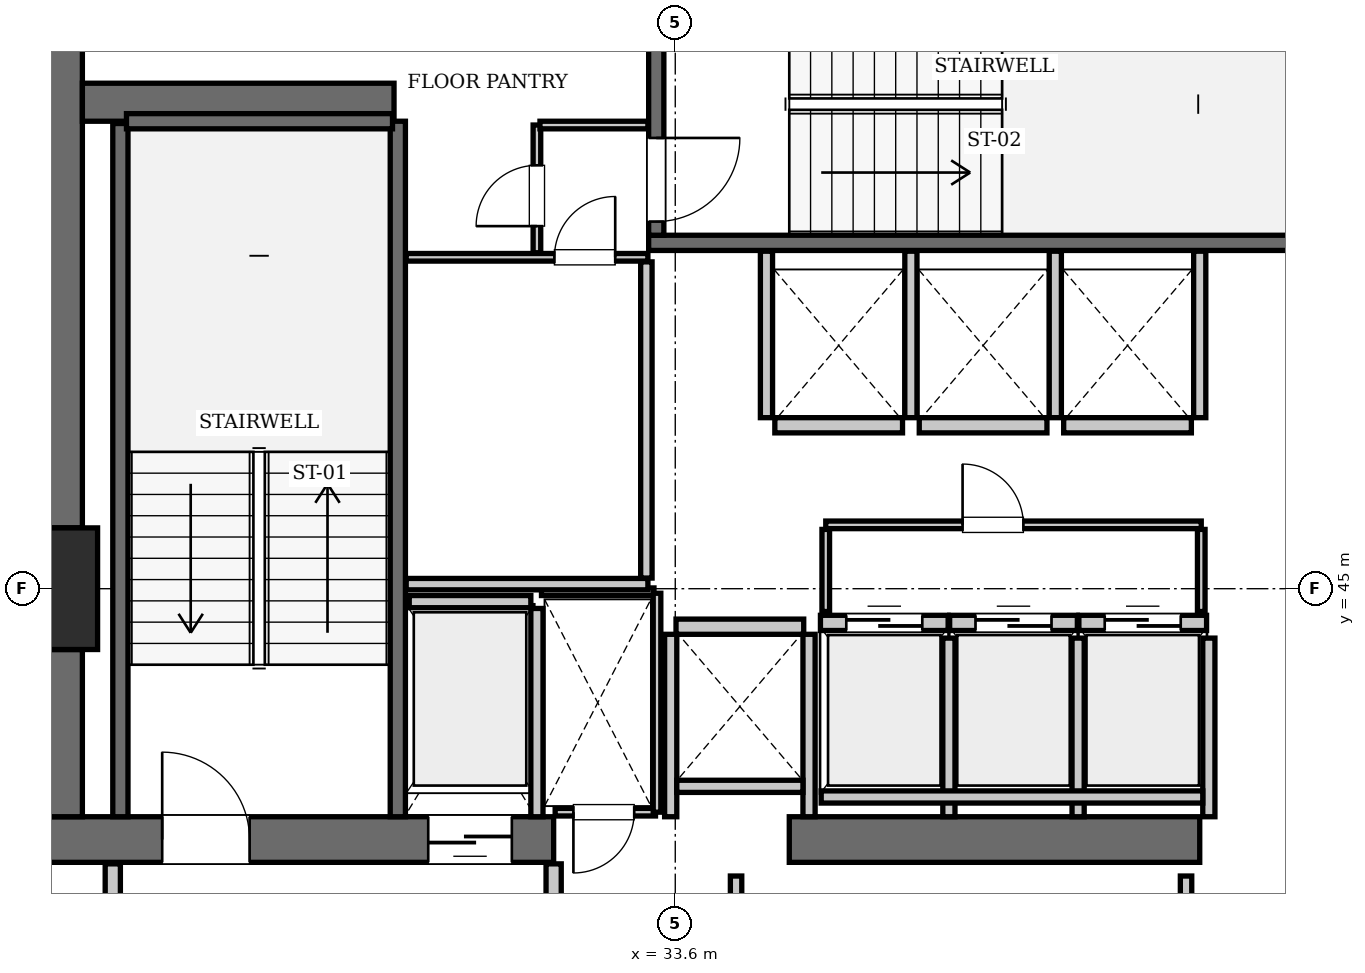
"""IFC4 building model, lengths in metres.
Left out: names, types, materials, properties, quantities, classifications, styles, units other than length and angle.
Written with IfcOpenShell. Run it as: python <this file> out.ifc"""

import sys

from ifc_helpers import new_model, si_unit, direction, frame, frame_2d, origin, origin_2d, place, context, subcontext, project, spatial, rectangle, extrude, element, fill, save


model = new_model("IFC4")
c1 = context("Model", 3, precision=1e-05, world=origin(), true_north=direction((0.0, 1.0)))
c2 = subcontext(c1, "Body", "Model", "MODEL_VIEW")
j1 = project(units=[si_unit("LENGTHUNIT", "METRE"), si_unit("PLANEANGLEUNIT", "RADIAN")], contexts=[c1])
p1 = place(None, origin())
s1 = spatial("IfcSite", under=j1, at=p1, CompositionType="ELEMENT")
p2 = place(p1, origin())
s2 = spatial("IfcBuilding", under=s1, at=p2, CompositionType="ELEMENT")
p3 = place(p2, frame((0.0, 0.0, 293.3)))
s3 = spatial("IfcBuildingStorey", under=s2, at=p3, CompositionType="ELEMENT", Elevation=293.3)
p4 = place(p3, frame((25.2, 45.0, 0.0), z_axis=(0.0, 0.0, 1.0), x_axis=(1.0, 0.0, 0.0)))
e1 = element("IfcColumn", 1, at=p4, inside=s3, PredefinedType="COLUMN", context=c2, shape_type="SweptSolid", body=[
    extrude(rectangle(XDim=1.6, YDim=1.6, at=origin_2d()), origin(), (0.0, 0.0, 1.0), 3.85),
])
p5 = place(p3, frame((25.2, 41.7, 0.0), z_axis=(0.0, 0.0, 1.0), x_axis=(1.0, 0.0, 0.0)))
e2 = element("IfcWall", 2, at=p5, inside=s3, PredefinedType="SHEAR", context=c2, shape_type="SweptSolid", body=[
    extrude(rectangle(XDim=6.8, YDim=0.6, at=frame_2d((3.4, 0.0))), origin(), (0.0, 0.0, 1.0), 3.85),
])
p6 = place(p5, frame((1.65, 0.0, 0.0)))
e3 = element("IfcOpeningElement", 3, at=p6, cuts=e2, PredefinedType="OPENING", context=c2, shape_type="SweptSolid", body=[
    extrude(rectangle(XDim=1.15, YDim=2.15, at=frame_2d((0.575, 1.075))), frame((0.0, 0.31, 0.0), z_axis=(0.0, -1.0, 0.0), x_axis=(1.0, 0.0, 0.0)), (0.0, 0.0, 1.0), 0.62),
])
p7 = place(p5, frame((5.15, 0.0, 0.0)))
e4 = element("IfcOpeningElement", 4, at=p7, cuts=e2, PredefinedType="OPENING", context=c2, shape_type="SweptSolid", body=[
    extrude(rectangle(XDim=1.1, YDim=2.2, at=frame_2d((0.55, 1.1))), frame((0.0, 0.31, 0.0), z_axis=(0.0, -1.0, 0.0), x_axis=(1.0, 0.0, 0.0)), (0.0, 0.0, 1.0), 0.62),
])
p8 = place(p3, frame((35.1, 41.7, 0.0), z_axis=(0.0, 0.0, 1.0), x_axis=(1.0, 0.0, 0.0)))
e5 = element("IfcWall", 5, at=p8, inside=s3, PredefinedType="SHEAR", context=c2, shape_type="SweptSolid", body=[
    extrude(rectangle(XDim=5.4, YDim=0.6, at=frame_2d((2.7, 0.0))), origin(), (0.0, 0.0, 1.0), 3.85),
])
p9 = place(p3, frame((25.5, 42.0, 0.0), z_axis=(0.0, 0.0, 1.0), x_axis=(0.0, 1.0, 0.0)))
e6 = element("IfcWall", 6, at=p9, inside=s3, PredefinedType="SHEAR", context=c2, shape_type="SweptSolid", body=[
    extrude(rectangle(XDim=2.2, YDim=0.6, at=frame_2d((1.1, 0.0))), origin(), (0.0, 0.0, 1.0), 3.85),
])
p10 = place(p3, frame((25.5, 45.8, 0.0), z_axis=(0.0, 0.0, 1.0), x_axis=(0.0, 1.0, 0.0)))
e7 = element("IfcWall", 7, at=p10, inside=s3, PredefinedType="SHEAR", context=c2, shape_type="SweptSolid", body=[
    extrude(rectangle(XDim=7.6, YDim=0.6, at=frame_2d((3.8, 0.0))), origin(), (0.0, 0.0, 1.0), 3.85),
])
p11 = place(p3, frame((25.8, 51.4, 0.0), z_axis=(0.0, 0.0, 1.0), x_axis=(1.0, 0.0, 0.0)))
e8 = element("IfcWall", 8, at=p11, inside=s3, PredefinedType="SHEAR", context=c2, shape_type="SweptSolid", body=[
    extrude(rectangle(XDim=4.1, YDim=0.5, at=frame_2d((2.05, 0.0))), origin(), (0.0, 0.0, 1.0), 3.85),
])
p12 = place(p3, frame((29.95, 42.0, 0.0), z_axis=(0.0, 0.0, 1.0), x_axis=(0.0, 1.0, 0.0)))
e9 = element("IfcWall", 9, at=p12, inside=s3, PredefinedType="SOLIDWALL", context=c2, shape_type="SweptSolid", body=[
    extrude(rectangle(XDim=9.15, YDim=0.2, at=frame_2d((4.575, 0.0))), origin(), (0.0, 0.0, 1.0), 3.61),
])
p13 = place(p3, frame((26.3, 42.0, 0.0), z_axis=(0.0, 0.0, 1.0), x_axis=(0.0, 1.0, 0.0)))
e10 = element("IfcWall", 10, at=p13, inside=s3, PredefinedType="SOLIDWALL", context=c2, shape_type="SweptSolid", body=[
    extrude(rectangle(XDim=9.12, YDim=0.2, at=frame_2d((4.56, 0.0))), origin(), (0.0, 0.0, 1.0), 3.61),
])
p14 = place(p3, frame((26.38, 51.15, 0.0), z_axis=(0.0, 0.0, 1.0), x_axis=(1.0, 0.0, 0.0)))
e11 = element("IfcWall", 11, at=p14, inside=s3, PredefinedType="SOLIDWALL", context=c2, shape_type="SweptSolid", body=[
    extrude(rectangle(XDim=3.5, YDim=0.2, at=frame_2d((1.75, 0.0))), origin(), (0.0, 0.0, 1.0), 3.61),
])
p15 = place(p3, frame((33.25, 49.55, 0.0), z_axis=(0.0, 0.0, 1.0), x_axis=(1.0, 0.0, 0.0)))
e12 = element("IfcWall", 12, at=p15, inside=s3, PredefinedType="SOLIDWALL", context=c2, shape_type="SweptSolid", body=[
    extrude(rectangle(XDim=9.1, YDim=0.2, at=frame_2d((4.55, 0.0))), origin(), (0.0, 0.0, 1.0), 3.61),
])
p16 = place(p3, frame((33.35, 49.65, 0.0), z_axis=(0.0, 0.0, 1.0), x_axis=(0.0, 1.0, 0.0)))
e13 = element("IfcWall", 13, at=p16, inside=s3, PredefinedType="SOLIDWALL", context=c2, shape_type="SweptSolid", body=[
    extrude(rectangle(XDim=3.75, YDim=0.2, at=frame_2d((1.875, 0.0))), origin(), (0.0, 0.0, 1.0), 3.61),
])
p17 = place(p16, frame((0.18, 0.0, 0.0)))
e14 = element("IfcOpeningElement", 14, at=p17, cuts=e13, PredefinedType="OPENING", context=c2, shape_type="SweptSolid", body=[
    extrude(rectangle(XDim=1.1, YDim=2.15, at=frame_2d((0.55, 1.075))), frame((0.0, 0.11, 0.0), z_axis=(0.0, -1.0, 0.0), x_axis=(1.0, 0.0, 0.0)), (0.0, 0.0, 1.0), 0.22),
])
p18 = place(p3, frame((35.51, 44.55, 0.0), z_axis=(0.0, 0.0, 1.0), x_axis=(1.0, 0.0, 0.0)))
e15 = element("IfcWall", 15, at=p18, inside=s3, PredefinedType="SOLIDWALL", context=c2, shape_type="SweptSolid", body=[
    extrude(rectangle(XDim=1.68, YDim=0.2, at=frame_2d((0.84, 0.0))), origin(), (0.0, 0.0, 1.0), 3.61),
])
p19 = place(p18, frame((0.34, 0.0, 0.0)))
e16 = element("IfcOpeningElement", 16, at=p19, cuts=e15, PredefinedType="OPENING", context=c2, shape_type="SweptSolid", body=[
    extrude(rectangle(XDim=1.0, YDim=2.15, at=frame_2d((0.5, 1.075))), frame((0.0, 0.11, 0.0), z_axis=(0.0, -1.0, 0.0), x_axis=(1.0, 0.0, 0.0)), (0.0, 0.0, 1.0), 0.22),
])
p20 = place(p3, frame((37.21, 44.55, 0.0), z_axis=(0.0, 0.0, 1.0), x_axis=(1.0, 0.0, 0.0)))
e17 = element("IfcWall", 17, at=p20, inside=s3, PredefinedType="SOLIDWALL", context=c2, shape_type="SweptSolid", body=[
    extrude(rectangle(XDim=1.68, YDim=0.2, at=frame_2d((0.84, 0.0))), origin(), (0.0, 0.0, 1.0), 3.61),
])
p21 = place(p20, frame((0.34, 0.0, 0.0)))
e18 = element("IfcOpeningElement", 18, at=p21, cuts=e17, PredefinedType="OPENING", context=c2, shape_type="SweptSolid", body=[
    extrude(rectangle(XDim=1.0, YDim=2.15, at=frame_2d((0.5, 1.075))), frame((0.0, 0.11, 0.0), z_axis=(0.0, -1.0, 0.0), x_axis=(1.0, 0.0, 0.0)), (0.0, 0.0, 1.0), 0.22),
])
p22 = place(p3, frame((38.91, 44.55, 0.0), z_axis=(0.0, 0.0, 1.0), x_axis=(1.0, 0.0, 0.0)))
e19 = element("IfcWall", 19, at=p22, inside=s3, PredefinedType="SOLIDWALL", context=c2, shape_type="SweptSolid", body=[
    extrude(rectangle(XDim=1.68, YDim=0.2, at=frame_2d((0.84, 0.0))), origin(), (0.0, 0.0, 1.0), 3.61),
])
p23 = place(p22, frame((0.34, 0.0, 0.0)))
e20 = element("IfcOpeningElement", 20, at=p23, cuts=e19, PredefinedType="OPENING", context=c2, shape_type="SweptSolid", body=[
    extrude(rectangle(XDim=1.0, YDim=2.15, at=frame_2d((0.5, 1.075))), frame((0.0, 0.11, 0.0), z_axis=(0.0, -1.0, 0.0), x_axis=(1.0, 0.0, 0.0)), (0.0, 0.0, 1.0), 0.22),
])
p24 = place(p3, frame((34.91, 47.15, 0.0), z_axis=(0.0, 0.0, 1.0), x_axis=(1.0, 0.0, 0.0)))
e21 = element("IfcWall", 21, at=p24, inside=s3, PredefinedType="SOLIDWALL", context=c2, shape_type="SweptSolid", body=[
    extrude(rectangle(XDim=1.68, YDim=0.2, at=frame_2d((0.84, 0.0))), origin(), (0.0, 0.0, 1.0), 3.61),
])
for number, where, z_axis, x_axis in (
    (22, (36.81, 47.15, 0.0), (0.0, 0.0, 1.0), (1.0, 0.0, 0.0)),
    (23, (38.71, 47.15, 0.0), (0.0, 0.0, 1.0), (1.0, 0.0, 0.0)),
    (24, (33.61, 44.5, 0.0), (0.0, 0.0, 1.0), (1.0, 0.0, 0.0)),
):
    element("IfcWall", number, at=place(p3, frame(where, z_axis=z_axis, x_axis=x_axis)), inside=s3, PredefinedType="SOLIDWALL", context=c2, shape_type="SweptSolid", body=[
        extrude(rectangle(XDim=1.68, YDim=0.2, at=frame_2d((0.84, 0.0))), origin(), (0.0, 0.0, 1.0), 3.61),
    ])
p25 = place(p3, frame((30.1, 44.83, 0.0), z_axis=(0.0, 0.0, 1.0), x_axis=(1.0, 0.0, 0.0)))
e25 = element("IfcWall", 25, at=p25, inside=s3, PredefinedType="SOLIDWALL", context=c2, shape_type="SweptSolid", body=[
    extrude(rectangle(XDim=1.6, YDim=0.16, at=frame_2d((0.8, 0.0))), origin(), (0.0, 0.0, 1.0), 3.61),
])
p26 = place(p3, frame((31.78, 42.0, 0.0), z_axis=(0.0, 0.0, 1.0), x_axis=(0.0, 1.0, 0.0)))
e26 = element("IfcWall", 26, at=p26, inside=s3, PredefinedType="SOLIDWALL", context=c2, shape_type="SweptSolid", body=[
    extrude(rectangle(XDim=2.74, YDim=0.16, at=frame_2d((1.37, 0.0))), origin(), (0.0, 0.0, 1.0), 3.61),
])
for number, where, z_axis, x_axis in (
    (27, (37.2, 42.0, 0.0), (0.0, 0.0, 1.0), (0.0, 1.0, 0.0)),
    (28, (38.9, 42.0, 0.0), (0.0, 0.0, 1.0), (0.0, 1.0, 0.0)),
    (29, (40.62, 42.0, 0.0), (0.0, 0.0, 1.0), (0.0, 1.0, 0.0)),
):
    element("IfcWall", number, at=place(p3, frame(where, z_axis=z_axis, x_axis=x_axis)), inside=s3, PredefinedType="SOLIDWALL", context=c2, shape_type="SweptSolid", body=[
        extrude(rectangle(XDim=2.35, YDim=0.16, at=frame_2d((1.175, 0.0))), origin(), (0.0, 0.0, 1.0), 3.61),
    ])
p27 = place(p3, frame((35.52, 42.26, 0.0), z_axis=(0.0, 0.0, 1.0), x_axis=(1.0, 0.0, 0.0)))
e30 = element("IfcWall", 30, at=p27, inside=s3, PredefinedType="SOLIDWALL", context=c2, shape_type="SweptSolid", body=[
    extrude(rectangle(XDim=5.02, YDim=0.16, at=frame_2d((2.51, 0.0))), origin(), (0.0, 0.0, 1.0), 3.61),
])
for number, where, z_axis, x_axis in (
    (31, (34.8, 47.25, 0.0), (0.0, 0.0, 1.0), (0.0, 1.0, 0.0)),
    (32, (36.7, 47.25, 0.0), (0.0, 0.0, 1.0), (0.0, 1.0, 0.0)),
    (33, (38.6, 47.25, 0.0), (0.0, 0.0, 1.0), (0.0, 1.0, 0.0)),
    (34, (40.5, 47.25, 0.0), (0.0, 0.0, 1.0), (0.0, 1.0, 0.0)),
):
    element("IfcWall", number, at=place(p3, frame(where, z_axis=z_axis, x_axis=x_axis)), inside=s3, PredefinedType="SOLIDWALL", context=c2, shape_type="SweptSolid", body=[
        extrude(rectangle(XDim=2.19, YDim=0.16, at=frame_2d((1.095, 0.0))), origin(), (0.0, 0.0, 1.0), 3.61),
    ])
for number, where, z_axis, x_axis in (
    (35, (33.54, 42.0, 0.0), (0.0, 0.0, 1.0), (0.0, 1.0, 0.0)),
    (36, (35.36, 42.0, 0.0), (0.0, 0.0, 1.0), (0.0, 1.0, 0.0)),
):
    element("IfcWall", number, at=place(p3, frame(where, z_axis=z_axis, x_axis=x_axis)), inside=s3, PredefinedType="SOLIDWALL", context=c2, shape_type="SweptSolid", body=[
        extrude(rectangle(XDim=2.4, YDim=0.16, at=frame_2d((1.2, 0.0))), origin(), (0.0, 0.0, 1.0), 3.61),
    ])
p28 = place(p3, frame((33.62, 42.4, 0.0), z_axis=(0.0, 0.0, 1.0), x_axis=(1.0, 0.0, 0.0)))
e37 = element("IfcWall", 37, at=p28, inside=s3, PredefinedType="SOLIDWALL", context=c2, shape_type="SweptSolid", body=[
    extrude(rectangle(XDim=1.66, YDim=0.16, at=frame_2d((0.83, 0.0))), origin(), (0.0, 0.0, 1.0), 3.61),
])
for number, where, z_axis, x_axis in (
    (38, (26.2, 38.31, 0.0), (0.0, 0.0, 1.0), (0.0, 1.0, 0.0)),
    (39, (32.0, 38.31, 0.0), (0.0, 0.0, 1.0), (0.0, 1.0, 0.0)),
):
    element("IfcWall", number, at=place(p3, frame(where, z_axis=z_axis, x_axis=x_axis)), inside=s3, PredefinedType="PARTITIONING", context=c2, shape_type="SweptSolid", body=[
        extrude(rectangle(XDim=3.07, YDim=0.2, at=frame_2d((1.535, 0.0))), origin(), (0.0, 0.0, 1.0), 3.61),
    ])
p29 = place(p3, frame((32.02, 42.06, 0.0), z_axis=(0.0, 0.0, 1.0), x_axis=(1.0, 0.0, 0.0)))
e40 = element("IfcWall", 40, at=p29, inside=s3, PredefinedType="PARTITIONING", context=c2, shape_type="SweptSolid", body=[
    extrude(rectangle(XDim=1.32, YDim=0.1, at=frame_2d((0.66, 0.0))), origin(), (0.0, 0.0, 1.0), 3.61),
])
p30 = place(p29, frame((0.24, 0.0, 0.0)))
e41 = element("IfcOpeningElement", 41, at=p30, cuts=e40, PredefinedType="OPENING", context=c2, shape_type="SweptSolid", body=[
    extrude(rectangle(XDim=0.8, YDim=2.05, at=frame_2d((0.4, 1.025))), frame((0.0, 0.06, 0.0), z_axis=(0.0, -1.0, 0.0), x_axis=(1.0, 0.0, 0.0)), (0.0, 0.0, 1.0), 0.12),
])
p31 = place(p3, frame((31.84, 44.96, 0.0), z_axis=(0.0, 0.0, 1.0), x_axis=(1.0, 0.0, 0.0)))
e42 = element("IfcWall", 42, at=p31, inside=s3, PredefinedType="PARTITIONING", context=c2, shape_type="SweptSolid", body=[
    extrude(rectangle(XDim=1.48, YDim=0.1, at=frame_2d((0.74, 0.0))), origin(), (0.0, 0.0, 1.0), 3.61),
])
p32 = place(p3, frame((33.36, 42.06, 0.0), z_axis=(0.0, 0.0, 1.0), x_axis=(0.0, 1.0, 0.0)))
e43 = element("IfcWall", 43, at=p32, inside=s3, PredefinedType="PARTITIONING", context=c2, shape_type="SweptSolid", body=[
    extrude(rectangle(XDim=2.88, YDim=0.1, at=frame_2d((1.44, 0.0))), origin(), (0.0, 0.0, 1.0), 3.61),
])
p33 = place(p3, frame((35.58, 45.84, 0.0), z_axis=(0.0, 0.0, 1.0), x_axis=(1.0, 0.0, 0.0)))
e44 = element("IfcWall", 44, at=p33, inside=s3, PredefinedType="PARTITIONING", context=c2, shape_type="SweptSolid", body=[
    extrude(rectangle(XDim=4.94, YDim=0.1, at=frame_2d((2.47, 0.0))), origin(), (0.0, 0.0, 1.0), 3.61),
])
p34 = place(p33, frame((1.8, 0.0, 0.0)))
e45 = element("IfcOpeningElement", 45, at=p34, cuts=e44, PredefinedType="OPENING", context=c2, shape_type="SweptSolid", body=[
    extrude(rectangle(XDim=0.8, YDim=2.05, at=frame_2d((0.4, 1.025))), frame((0.0, 0.06, 0.0), z_axis=(0.0, -1.0, 0.0), x_axis=(1.0, 0.0, 0.0)), (0.0, 0.0, 1.0), 0.12),
])
for number, where, z_axis, x_axis in (
    (46, (35.58, 44.7, 0.0), (0.0, 0.0, 1.0), (0.0, 1.0, 0.0)),
    (47, (40.52, 44.7, 0.0), (0.0, 0.0, 1.0), (0.0, 1.0, 0.0)),
):
    element("IfcWall", number, at=place(p3, frame(where, z_axis=z_axis, x_axis=x_axis)), inside=s3, PredefinedType="PARTITIONING", context=c2, shape_type="SweptSolid", body=[
        extrude(rectangle(XDim=1.08, YDim=0.1, at=frame_2d((0.54, 0.0))), origin(), (0.0, 0.0, 1.0), 3.61),
    ])
p35 = place(p3, frame((30.06, 45.06, 0.0), z_axis=(0.0, 0.0, 1.0), x_axis=(1.0, 0.0, 0.0)))
e48 = element("IfcWall", 48, at=p35, inside=s3, PredefinedType="PARTITIONING", context=c2, shape_type="SweptSolid", body=[
    extrude(rectangle(XDim=3.18, YDim=0.15, at=frame_2d((1.59, 0.0))), origin(), (0.0, 0.0, 1.0), 3.61),
])
p36 = place(p3, frame((33.22, 45.14, 0.0), z_axis=(0.0, 0.0, 1.0), x_axis=(0.0, 1.0, 0.0)))
e49 = element("IfcWall", 49, at=p36, inside=s3, PredefinedType="PARTITIONING", context=c2, shape_type="SweptSolid", body=[
    extrude(rectangle(XDim=4.16, YDim=0.15, at=frame_2d((2.08, 0.0))), origin(), (0.0, 0.0, 1.0), 3.61),
])
p37 = place(p3, frame((30.06, 49.36, 0.0), z_axis=(0.0, 0.0, 1.0), x_axis=(1.0, 0.0, 0.0)))
e50 = element("IfcWall", 50, at=p37, inside=s3, PredefinedType="PARTITIONING", context=c2, shape_type="SweptSolid", body=[
    extrude(rectangle(XDim=3.18, YDim=0.1, at=frame_2d((1.59, 0.0))), origin(), (0.0, 0.0, 1.0), 3.61),
])
p38 = place(p37, frame((1.95, 0.0, 0.0)))
e51 = element("IfcOpeningElement", 51, at=p38, cuts=e50, PredefinedType="OPENING", context=c2, shape_type="SweptSolid", body=[
    extrude(rectangle(XDim=0.8, YDim=2.05, at=frame_2d((0.4, 1.025))), frame((0.0, 0.06, 0.0), z_axis=(0.0, -1.0, 0.0), x_axis=(1.0, 0.0, 0.0)), (0.0, 0.0, 1.0), 0.12),
])
p39 = place(p3, frame((31.78, 49.42, 0.0), z_axis=(0.0, 0.0, 1.0), x_axis=(0.0, 1.0, 0.0)))
e52 = element("IfcWall", 52, at=p39, inside=s3, PredefinedType="PARTITIONING", context=c2, shape_type="SweptSolid", body=[
    extrude(rectangle(XDim=1.68, YDim=0.1, at=frame_2d((0.84, 0.0))), origin(), (0.0, 0.0, 1.0), 3.61),
])
p40 = place(p39, frame((0.35, 0.0, 0.0)))
e53 = element("IfcOpeningElement", 53, at=p40, cuts=e52, PredefinedType="OPENING", context=c2, shape_type="SweptSolid", body=[
    extrude(rectangle(XDim=0.8, YDim=2.05, at=frame_2d((0.4, 1.025))), frame((0.0, 0.06, 0.0), z_axis=(0.0, -1.0, 0.0), x_axis=(1.0, 0.0, 0.0)), (0.0, 0.0, 1.0), 0.12),
])
p41 = place(p3, frame((31.82, 51.1, 0.0), z_axis=(0.0, 0.0, 1.0), x_axis=(1.0, 0.0, 0.0)))
e54 = element("IfcWall", 54, at=p41, inside=s3, PredefinedType="PARTITIONING", context=c2, shape_type="SweptSolid", body=[
    extrude(rectangle(XDim=1.42, YDim=0.1, at=frame_2d((0.71, 0.0))), origin(), (0.0, 0.0, 1.0), 3.61),
])
for number, where, z_axis, x_axis in (
    (55, (34.4, 38.38, 0.0), (0.0, 0.0, 1.0), (0.0, 1.0, 0.0)),
    (56, (40.32, 38.38, 0.0), (0.0, 0.0, 1.0), (0.0, 1.0, 0.0)),
):
    element("IfcWall", number, at=place(p3, frame(where, z_axis=z_axis, x_axis=x_axis)), inside=s3, PredefinedType="PARTITIONING", context=c2, shape_type="SweptSolid", body=[
        extrude(rectangle(XDim=2.84, YDim=0.15, at=frame_2d((1.42, 0.0))), origin(), (0.0, 0.0, 1.0), 3.61),
    ])
p42 = place(p6, origin())
e57 = element("IfcDoor", 57, at=p42, inside=s3, OperationType="SINGLE_SWING_LEFT", PredefinedType="DOOR", context=c2, shape_type="SweptSolid", body=[
    extrude(rectangle(XDim=1.15, YDim=2.15, at=frame_2d((0.575, 1.075))), frame((0.0, 0.025, 0.0), z_axis=(0.0, -1.0, 0.0), x_axis=(1.0, 0.0, 0.0)), (0.0, 0.0, 1.0), 0.05),
])
fill(e3, e57)
p43 = place(p17, frame((1.1, 0.0, 0.0), z_axis=(0.0, 0.0, 1.0), x_axis=(-1.0, 0.0, 0.0)))
e58 = element("IfcDoor", 58, at=p43, inside=s3, OperationType="SINGLE_SWING_LEFT", PredefinedType="DOOR", context=c2, shape_type="SweptSolid", body=[
    extrude(rectangle(XDim=1.1, YDim=2.15, at=frame_2d((0.55, 1.075))), frame((0.0, 0.025, 0.0), z_axis=(0.0, -1.0, 0.0), x_axis=(1.0, 0.0, 0.0)), (0.0, 0.0, 1.0), 0.05),
])
fill(e14, e58)
p44 = place(p19, origin())
e59 = element("IfcDoor", 59, at=p44, inside=s3, OperationType="SLIDING_TO_LEFT", PredefinedType="DOOR", context=c2, shape_type="SweptSolid", body=[
    extrude(rectangle(XDim=1.0, YDim=2.15, at=frame_2d((0.5, 1.075))), frame((0.0, 0.025, 0.0), z_axis=(0.0, -1.0, 0.0), x_axis=(1.0, 0.0, 0.0)), (0.0, 0.0, 1.0), 0.05),
])
fill(e16, e59)
p45 = place(p21, origin())
e60 = element("IfcDoor", 60, at=p45, inside=s3, OperationType="SLIDING_TO_LEFT", PredefinedType="DOOR", context=c2, shape_type="SweptSolid", body=[
    extrude(rectangle(XDim=1.0, YDim=2.15, at=frame_2d((0.5, 1.075))), frame((0.0, 0.025, 0.0), z_axis=(0.0, -1.0, 0.0), x_axis=(1.0, 0.0, 0.0)), (0.0, 0.0, 1.0), 0.05),
])
fill(e18, e60)
p46 = place(p23, origin())
e61 = element("IfcDoor", 61, at=p46, inside=s3, OperationType="SLIDING_TO_LEFT", PredefinedType="DOOR", context=c2, shape_type="SweptSolid", body=[
    extrude(rectangle(XDim=1.0, YDim=2.15, at=frame_2d((0.5, 1.075))), frame((0.0, 0.025, 0.0), z_axis=(0.0, -1.0, 0.0), x_axis=(1.0, 0.0, 0.0)), (0.0, 0.0, 1.0), 0.05),
])
fill(e20, e61)
p47 = place(p7, frame((1.1, 0.0, 0.0), z_axis=(0.0, 0.0, 1.0), x_axis=(-1.0, 0.0, 0.0)))
e62 = element("IfcDoor", 62, at=p47, inside=s3, OperationType="SLIDING_TO_LEFT", PredefinedType="DOOR", context=c2, shape_type="SweptSolid", body=[
    extrude(rectangle(XDim=1.1, YDim=2.2, at=frame_2d((0.55, 1.1))), frame((0.0, 0.025, 0.0), z_axis=(0.0, -1.0, 0.0), x_axis=(1.0, 0.0, 0.0)), (0.0, 0.0, 1.0), 0.05),
])
fill(e4, e62)
p48 = place(p30, frame((0.8, 0.0, 0.0), z_axis=(0.0, 0.0, 1.0), x_axis=(-1.0, 0.0, 0.0)))
e63 = element("IfcDoor", 63, at=p48, inside=s3, OperationType="SINGLE_SWING_RIGHT", PredefinedType="DOOR", context=c2, shape_type="SweptSolid", body=[
    extrude(rectangle(XDim=0.8, YDim=2.05, at=frame_2d((0.4, 1.025))), frame((0.0, 0.025, 0.0), z_axis=(0.0, -1.0, 0.0), x_axis=(1.0, 0.0, 0.0)), (0.0, 0.0, 1.0), 0.05),
])
fill(e41, e63)
p49 = place(p34, origin())
e64 = element("IfcDoor", 64, at=p49, inside=s3, OperationType="SINGLE_SWING_LEFT", PredefinedType="DOOR", context=c2, shape_type="SweptSolid", body=[
    extrude(rectangle(XDim=0.8, YDim=2.05, at=frame_2d((0.4, 1.025))), frame((0.0, 0.025, 0.0), z_axis=(0.0, -1.0, 0.0), x_axis=(1.0, 0.0, 0.0)), (0.0, 0.0, 1.0), 0.05),
])
fill(e45, e64)
p50 = place(p38, origin())
e65 = element("IfcDoor", 65, at=p50, inside=s3, OperationType="SINGLE_SWING_RIGHT", PredefinedType="DOOR", context=c2, shape_type="SweptSolid", body=[
    extrude(rectangle(XDim=0.8, YDim=2.05, at=frame_2d((0.4, 1.025))), frame((0.0, 0.025, 0.0), z_axis=(0.0, -1.0, 0.0), x_axis=(1.0, 0.0, 0.0)), (0.0, 0.0, 1.0), 0.05),
])
fill(e51, e65)
p51 = place(p40, origin())
e66 = element("IfcDoor", 66, at=p51, inside=s3, OperationType="SINGLE_SWING_LEFT", PredefinedType="DOOR", context=c2, shape_type="SweptSolid", body=[
    extrude(rectangle(XDim=0.8, YDim=2.05, at=frame_2d((0.4, 1.025))), frame((0.0, 0.025, 0.0), z_axis=(0.0, -1.0, 0.0), x_axis=(1.0, 0.0, 0.0)), (0.0, 0.0, 1.0), 0.05),
])
fill(e53, e66)
save(model, sys.argv[1])
